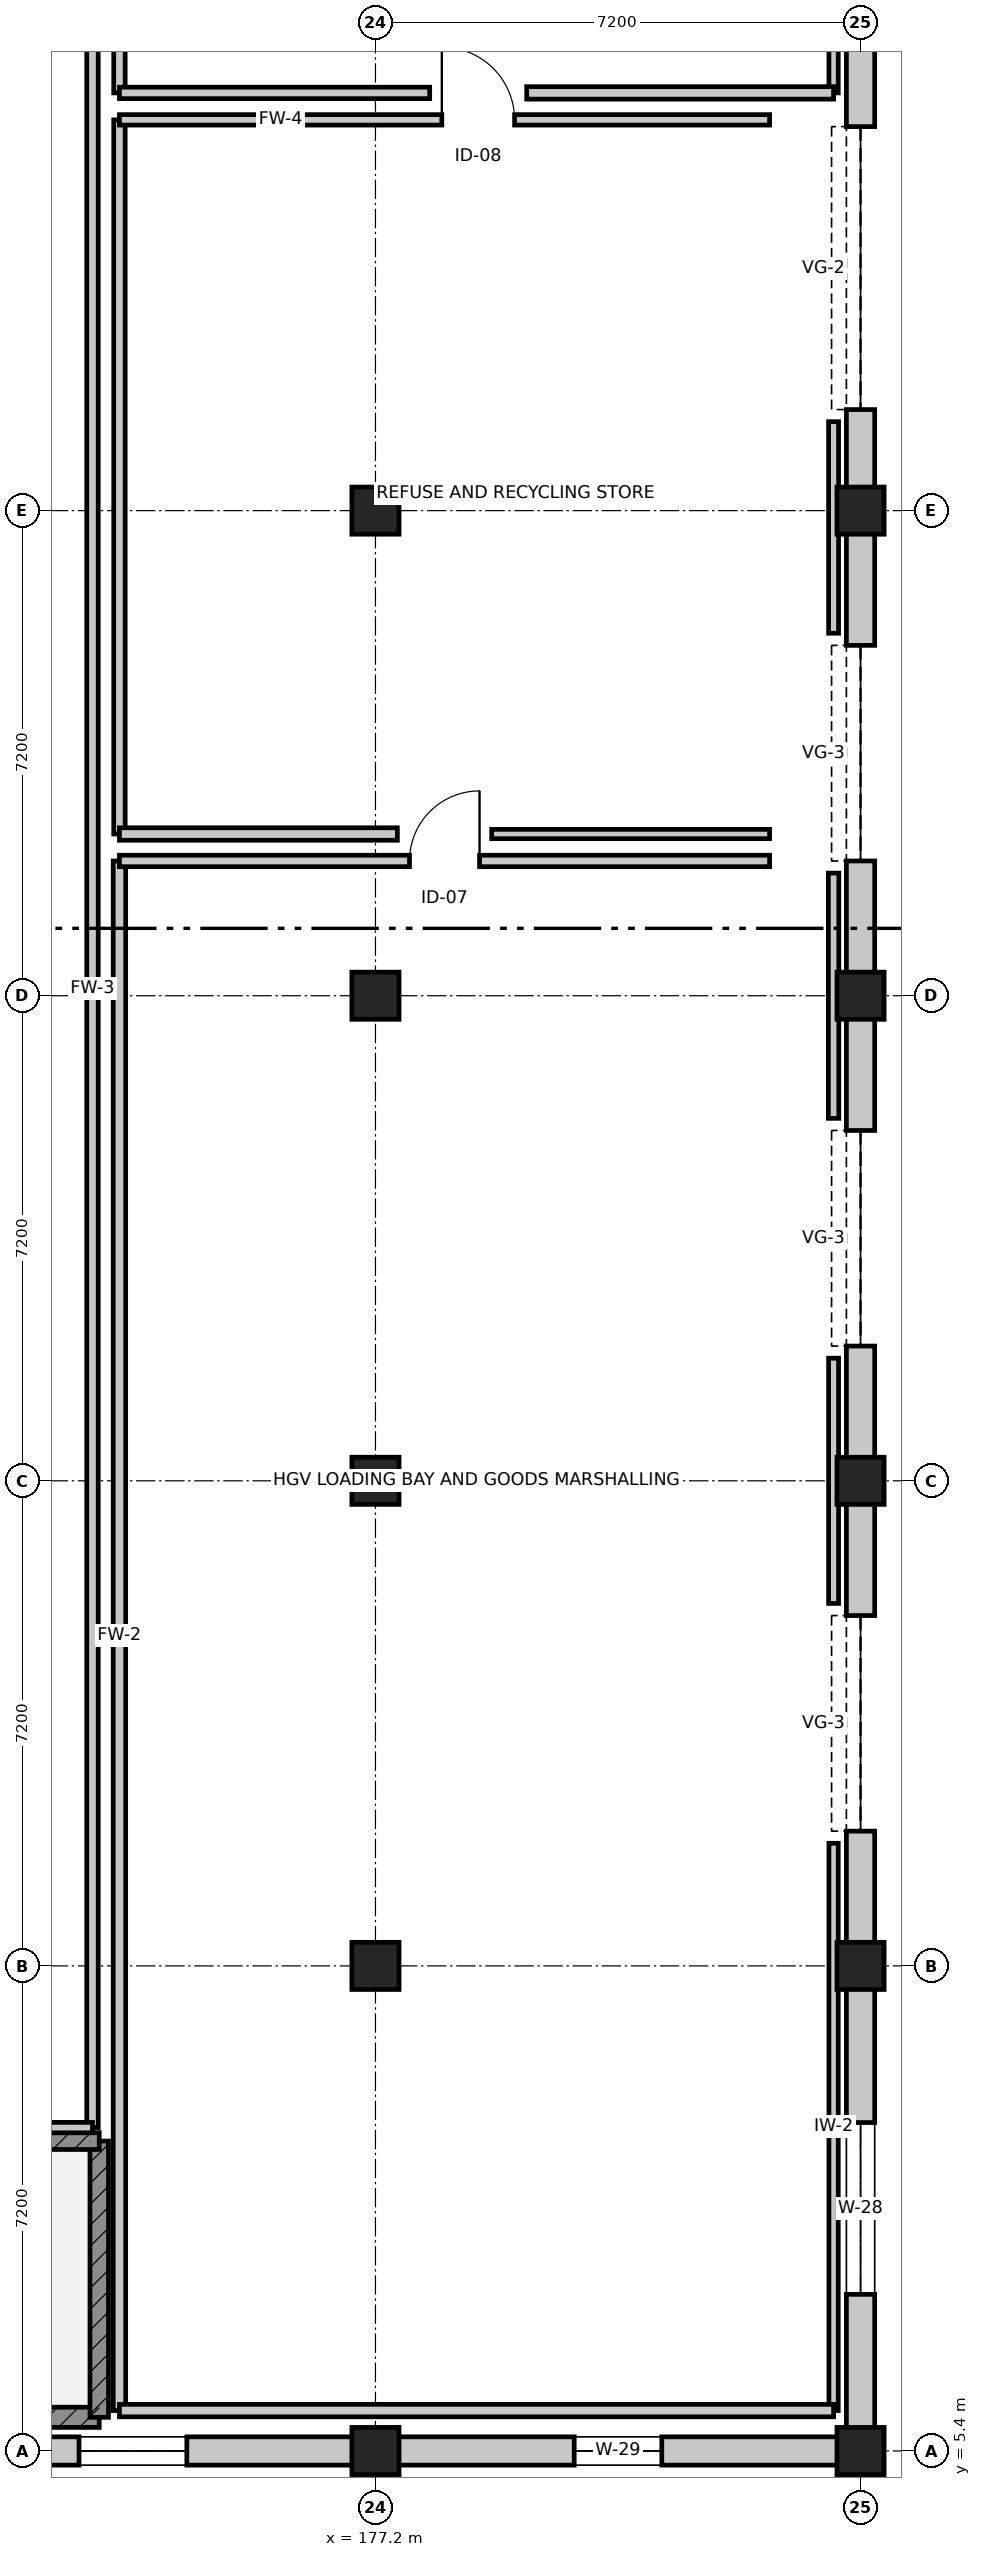
"""IFC4 building model, lengths in metres.
Left out: names, types, materials, properties, quantities, classifications, styles, units other than length and angle.
Written with IfcOpenShell. Run it as: python <this file> out.ifc"""

import sys

from ifc_helpers import new_model, si_unit, direction, frame, frame_2d, origin, origin_2d, place, context, subcontext, project, spatial, rectangle, extrude, element, fill, save


model = new_model("IFC4")
c1 = context("Model", 3, precision=1e-05, world=origin(), true_north=direction((0.0, 1.0)))
c2 = subcontext(c1, "Body", "Model", "MODEL_VIEW")
j1 = project(units=[si_unit("LENGTHUNIT", "METRE"), si_unit("PLANEANGLEUNIT", "RADIAN")], contexts=[c1])
p1 = place(None, origin())
s1 = spatial("IfcSite", under=j1, at=p1, CompositionType="ELEMENT")
p2 = place(p1, origin())
s2 = spatial("IfcBuilding", under=s1, at=p2, CompositionType="ELEMENT")
p3 = place(p2, origin())
s3 = spatial("IfcBuildingStorey", under=s2, at=p3, CompositionType="ELEMENT", Elevation=0.0)
for number, where, z_axis, x_axis in (
    (1, (177.2, 5.4, 0.0), (0.0, 0.0, 1.0), (1.0, 0.0, 0.0)),
    (2, (177.2, 12.6, 0.0), (0.0, 0.0, 1.0), (1.0, 0.0, 0.0)),
    (3, (177.2, 19.8, 0.0), (0.0, 0.0, 1.0), (1.0, 0.0, 0.0)),
    (4, (177.2, 27.0, 0.0), (0.0, 0.0, 1.0), (1.0, 0.0, 0.0)),
    (5, (177.2, 34.2, 0.0), (0.0, 0.0, 1.0), (1.0, 0.0, 0.0)),
    (6, (184.4, 5.4, 0.0), (0.0, 0.0, 1.0), (1.0, 0.0, 0.0)),
    (7, (184.4, 12.6, 0.0), (0.0, 0.0, 1.0), (1.0, 0.0, 0.0)),
    (8, (184.4, 19.8, 0.0), (0.0, 0.0, 1.0), (1.0, 0.0, 0.0)),
    (9, (184.4, 27.0, 0.0), (0.0, 0.0, 1.0), (1.0, 0.0, 0.0)),
    (10, (184.4, 34.2, 0.0), (0.0, 0.0, 1.0), (1.0, 0.0, 0.0)),
):
    element("IfcColumn", number, at=place(p3, frame(where, z_axis=z_axis, x_axis=x_axis)), inside=s3, PredefinedType="COLUMN", context=c2, shape_type="SweptSolid", body=[
        extrude(rectangle(XDim=0.7, YDim=0.7, at=origin_2d()), origin(), (0.0, 0.0, 1.0), 5.4),
    ])
p4 = place(p3, frame((184.4, 41.4, 0.0), z_axis=(0.0, 0.0, 1.0), x_axis=(0.0, -1.0, 0.0)))
e11 = element("IfcWall", 11, at=p4, inside=s3, PredefinedType="STANDARD", context=c2, shape_type="SweptSolid", body=[
    extrude(rectangle(XDim=7.2, YDim=0.42, at=frame_2d((3.6, 0.0))), origin(), (0.0, 0.0, 1.0), 4.625),
])
p5 = place(p4, frame((1.5, 0.0, 0.0)))
e12 = element("IfcOpeningElement", 12, at=p5, cuts=e11, PredefinedType="OPENING", context=c2, shape_type="SweptSolid", body=[
    extrude(rectangle(XDim=4.2, YDim=3.6, at=frame_2d((2.1, 1.8))), frame((0.0, 0.22, 0.0), z_axis=(0.0, -1.0, 0.0), x_axis=(1.0, 0.0, 0.0)), (0.0, 0.0, 1.0), 0.44),
])
p6 = place(p3, frame((184.4, 34.2, 0.0), z_axis=(0.0, 0.0, 1.0), x_axis=(0.0, -1.0, 0.0)))
e13 = element("IfcWall", 13, at=p6, inside=s3, PredefinedType="STANDARD", context=c2, shape_type="SweptSolid", body=[
    extrude(rectangle(XDim=7.2, YDim=0.42, at=frame_2d((3.6, 0.0))), origin(), (0.0, 0.0, 1.0), 4.625),
])
p7 = place(p6, frame((2.0, 0.0, 0.0)))
e14 = element("IfcOpeningElement", 14, at=p7, cuts=e13, PredefinedType="OPENING", context=c2, shape_type="SweptSolid", body=[
    extrude(rectangle(XDim=3.2, YDim=2.8, at=frame_2d((1.6, 1.4))), frame((0.0, 0.22, 0.0), z_axis=(0.0, -1.0, 0.0), x_axis=(1.0, 0.0, 0.0)), (0.0, 0.0, 1.0), 0.44),
])
p8 = place(p3, frame((184.4, 27.0, 0.0), z_axis=(0.0, 0.0, 1.0), x_axis=(0.0, -1.0, 0.0)))
e15 = element("IfcWall", 15, at=p8, inside=s3, PredefinedType="STANDARD", context=c2, shape_type="SweptSolid", body=[
    extrude(rectangle(XDim=7.2, YDim=0.42, at=frame_2d((3.6, 0.0))), origin(), (0.0, 0.0, 1.0), 4.625),
])
p9 = place(p8, frame((2.0, 0.0, 0.0)))
e16 = element("IfcOpeningElement", 16, at=p9, cuts=e15, PredefinedType="OPENING", context=c2, shape_type="SweptSolid", body=[
    extrude(rectangle(XDim=3.2, YDim=2.8, at=frame_2d((1.6, 1.4))), frame((0.0, 0.22, 0.0), z_axis=(0.0, -1.0, 0.0), x_axis=(1.0, 0.0, 0.0)), (0.0, 0.0, 1.0), 0.44),
])
p10 = place(p3, frame((184.4, 19.8, 0.0), z_axis=(0.0, 0.0, 1.0), x_axis=(0.0, -1.0, 0.0)))
e17 = element("IfcWall", 17, at=p10, inside=s3, PredefinedType="STANDARD", context=c2, shape_type="SweptSolid", body=[
    extrude(rectangle(XDim=7.2, YDim=0.42, at=frame_2d((3.6, 0.0))), origin(), (0.0, 0.0, 1.0), 4.625),
])
p11 = place(p10, frame((2.0, 0.0, 0.0)))
e18 = element("IfcOpeningElement", 18, at=p11, cuts=e17, PredefinedType="OPENING", context=c2, shape_type="SweptSolid", body=[
    extrude(rectangle(XDim=3.2, YDim=2.8, at=frame_2d((1.6, 1.4))), frame((0.0, 0.22, 0.0), z_axis=(0.0, -1.0, 0.0), x_axis=(1.0, 0.0, 0.0)), (0.0, 0.0, 1.0), 0.44),
])
p12 = place(p3, frame((184.4, 12.6, 0.0), z_axis=(0.0, 0.0, 1.0), x_axis=(0.0, -1.0, 0.0)))
e19 = element("IfcWall", 19, at=p12, inside=s3, PredefinedType="STANDARD", context=c2, shape_type="SweptSolid", body=[
    extrude(rectangle(XDim=7.2, YDim=0.42, at=frame_2d((3.6, 0.0))), origin(), (0.0, 0.0, 1.0), 4.625),
])
p13 = place(p12, frame((2.325, 0.0, 0.9)))
e20 = element("IfcOpeningElement", 20, at=p13, cuts=e19, PredefinedType="OPENING", context=c2, shape_type="SweptSolid", body=[
    extrude(rectangle(XDim=2.55, YDim=1.85, at=frame_2d((1.275, 0.925))), frame((0.0, 0.22, 0.0), z_axis=(0.0, -1.0, 0.0), x_axis=(1.0, 0.0, 0.0)), (0.0, 0.0, 1.0), 0.44),
])
p14 = place(p3, frame((184.4, 5.4, 0.0), z_axis=(0.0, 0.0, 1.0), x_axis=(-1.0, 0.0, 0.0)))
e21 = element("IfcWall", 21, at=p14, inside=s3, PredefinedType="STANDARD", context=c2, shape_type="SweptSolid", body=[
    extrude(rectangle(XDim=7.2, YDim=0.42, at=frame_2d((3.6, 0.0))), origin(), (0.0, 0.0, 1.0), 4.435),
])
p15 = place(p14, frame((2.95, 0.0, 0.9)))
e22 = element("IfcOpeningElement", 22, at=p15, cuts=e21, PredefinedType="OPENING", context=c2, shape_type="SweptSolid", body=[
    extrude(rectangle(XDim=1.3, YDim=1.95, at=frame_2d((0.65, 0.975))), frame((0.0, 0.22, 0.0), z_axis=(0.0, -1.0, 0.0), x_axis=(1.0, 0.0, 0.0)), (0.0, 0.0, 1.0), 0.44),
])
p16 = place(p3, frame((177.2, 5.4, 0.0), z_axis=(0.0, 0.0, 1.0), x_axis=(-1.0, 0.0, 0.0)))
e23 = element("IfcWall", 23, at=p16, inside=s3, PredefinedType="STANDARD", context=c2, shape_type="SweptSolid", body=[
    extrude(rectangle(XDim=7.2, YDim=0.42, at=frame_2d((3.6, 0.0))), origin(), (0.0, 0.0, 1.0), 4.435),
])
p17 = place(p16, frame((2.8, 0.0, 0.9)))
e24 = element("IfcOpeningElement", 24, at=p17, cuts=e23, PredefinedType="OPENING", context=c2, shape_type="SweptSolid", body=[
    extrude(rectangle(XDim=1.6, YDim=1.95, at=frame_2d((0.8, 0.975))), frame((0.0, 0.22, 0.0), z_axis=(0.0, -1.0, 0.0), x_axis=(1.0, 0.0, 0.0)), (0.0, 0.0, 1.0), 0.44),
])
p18 = place(p3, frame((164.1, 5.9, 0.0), z_axis=(0.0, 0.0, 1.0), x_axis=(1.0, 0.0, 0.0)))
e25 = element("IfcWall", 25, at=p18, inside=s3, PredefinedType="SHEAR", context=c2, shape_type="SweptSolid", body=[
    extrude(rectangle(XDim=9.0, YDim=0.3, at=frame_2d((4.5, 0.0))), origin(), (0.0, 0.0, 1.0), 5.1),
])
p19 = place(p3, frame((173.1, 5.9, 0.0), z_axis=(0.0, 0.0, 1.0), x_axis=(0.0, 1.0, 0.0)))
e26 = element("IfcWall", 26, at=p19, inside=s3, PredefinedType="SHEAR", context=c2, shape_type="SweptSolid", body=[
    extrude(rectangle(XDim=4.1, YDim=0.275, at=frame_2d((2.05, 0.0))), origin(), (0.0, 0.0, 1.0), 5.1),
])
p20 = place(p3, frame((173.1, 10.0, 0.0), z_axis=(0.0, 0.0, 1.0), x_axis=(-1.0, 0.0, 0.0)))
e27 = element("IfcWall", 27, at=p20, inside=s3, PredefinedType="SHEAR", context=c2, shape_type="SweptSolid", body=[
    extrude(rectangle(XDim=9.0, YDim=0.25, at=frame_2d((4.5, 0.0))), origin(), (0.0, 0.0, 1.0), 5.1),
])
p21 = place(p20, frame((7.35, 0.0, 0.0)))
e28 = element("IfcOpeningElement", 28, at=p21, cuts=e27, PredefinedType="OPENING", context=c2, shape_type="SweptSolid", body=[
    extrude(rectangle(XDim=1.1, YDim=2.1, at=frame_2d((0.55, 1.05))), frame((0.0, 0.135, 0.0), z_axis=(0.0, -1.0, 0.0), x_axis=(1.0, 0.0, 0.0)), (0.0, 0.0, 1.0), 0.27),
])
p22 = place(p3, frame((173.0, 44.0, 0.0), z_axis=(0.0, 0.0, 1.0), x_axis=(0.0, -1.0, 0.0)))
e29 = element("IfcWall", 29, at=p22, inside=s3, PredefinedType="PARTITIONING", context=c2, shape_type="SweptSolid", body=[
    extrude(rectangle(XDim=33.8, YDim=0.17, at=frame_2d((16.9, 0.0))), origin(), (0.0, 0.0, 1.0), 4.473),
])
p23 = place(p3, frame((173.0, 10.2, 0.0), z_axis=(0.0, 0.0, 1.0), x_axis=(-1.0, 0.0, 0.0)))
e30 = element("IfcWall", 30, at=p23, inside=s3, PredefinedType="PARTITIONING", context=c2, shape_type="SweptSolid", body=[
    extrude(rectangle(XDim=7.07, YDim=0.155, at=frame_2d((3.535, 0.0))), origin(), (0.0, 0.0, 1.0), 5.1),
])
p24 = place(p3, frame((173.4, 6.0, 0.0), z_axis=(0.0, 0.0, 1.0), x_axis=(0.0, 1.0, 0.0)))
e31 = element("IfcWall", 31, at=p24, inside=s3, PredefinedType="PARTITIONING", context=c2, shape_type="SweptSolid", body=[
    extrude(rectangle(XDim=23.0, YDim=0.185, at=frame_2d((11.5, 0.0))), origin(), (0.0, 0.0, 1.0), 4.473),
])
p25 = place(p3, frame((173.4, 29.0, 0.0), z_axis=(0.0, 0.0, 1.0), x_axis=(1.0, 0.0, 0.0)))
e32 = element("IfcWall", 32, at=p25, inside=s3, PredefinedType="PARTITIONING", context=c2, shape_type="SweptSolid", body=[
    extrude(rectangle(XDim=9.65, YDim=0.17, at=frame_2d((4.825, 0.0))), origin(), (0.0, 0.0, 1.0), 4.397),
])
p26 = place(p25, frame((4.305, 0.0, 0.0)))
e33 = element("IfcOpeningElement", 33, at=p26, cuts=e32, PredefinedType="OPENING", context=c2, shape_type="SweptSolid", body=[
    extrude(rectangle(XDim=1.04, YDim=2.12, at=frame_2d((0.52, 1.06))), frame((0.0, 0.095, 0.0), z_axis=(0.0, -1.0, 0.0), x_axis=(1.0, 0.0, 0.0)), (0.0, 0.0, 1.0), 0.19),
])
p27 = place(p3, frame((184.0, 28.82, 0.0), z_axis=(0.0, 0.0, 1.0), x_axis=(0.0, -1.0, 0.0)))
e34 = element("IfcWall", 34, at=p27, inside=s3, PredefinedType="PARTITIONING", context=c2, shape_type="SweptSolid", body=[
    extrude(rectangle(XDim=3.64, YDim=0.155, at=frame_2d((1.82, 0.0))), origin(), (0.0, 0.0, 1.0), 4.473),
])
p28 = place(p3, frame((184.0, 21.62, 0.0), z_axis=(0.0, 0.0, 1.0), x_axis=(0.0, -1.0, 0.0)))
e35 = element("IfcWall", 35, at=p28, inside=s3, PredefinedType="PARTITIONING", context=c2, shape_type="SweptSolid", body=[
    extrude(rectangle(XDim=3.64, YDim=0.148, at=frame_2d((1.82, 0.0))), origin(), (0.0, 0.0, 1.0), 4.473),
])
p29 = place(p3, frame((184.0, 14.42, 0.0), z_axis=(0.0, 0.0, 1.0), x_axis=(0.0, -1.0, 0.0)))
e36 = element("IfcWall", 36, at=p29, inside=s3, PredefinedType="PARTITIONING", context=c2, shape_type="SweptSolid", body=[
    extrude(rectangle(XDim=8.42, YDim=0.138, at=frame_2d((4.21, 0.0))), origin(), (0.0, 0.0, 1.0), 4.473),
])
p30 = place(p3, frame((184.0, 6.0, 0.0), z_axis=(0.0, 0.0, 1.0), x_axis=(-1.0, 0.0, 0.0)))
e37 = element("IfcWall", 37, at=p30, inside=s3, PredefinedType="PARTITIONING", context=c2, shape_type="SweptSolid", body=[
    extrude(rectangle(XDim=10.6, YDim=0.185, at=frame_2d((5.3, 0.0))), origin(), (0.0, 0.0, 1.0), 4.397),
])
p31 = place(p3, frame((173.4, 29.4, 0.0), z_axis=(0.0, 0.0, 1.0), x_axis=(0.0, 1.0, 0.0)))
e38 = element("IfcWall", 38, at=p31, inside=s3, PredefinedType="PARTITIONING", context=c2, shape_type="SweptSolid", body=[
    extrude(rectangle(XDim=10.6, YDim=0.17, at=frame_2d((5.3, 0.0))), origin(), (0.0, 0.0, 1.0), 4.473),
])
p32 = place(p3, frame((173.4, 40.0, 0.0), z_axis=(0.0, 0.0, 1.0), x_axis=(1.0, 0.0, 0.0)))
e39 = element("IfcWall", 39, at=p32, inside=s3, PredefinedType="PARTITIONING", context=c2, shape_type="SweptSolid", body=[
    extrude(rectangle(XDim=9.65, YDim=0.155, at=frame_2d((4.825, 0.0))), origin(), (0.0, 0.0, 1.0), 4.397),
])
p33 = place(p32, frame((4.785, 0.0, 0.0)))
e40 = element("IfcOpeningElement", 40, at=p33, cuts=e39, PredefinedType="OPENING", context=c2, shape_type="SweptSolid", body=[
    extrude(rectangle(XDim=1.08, YDim=2.15, at=frame_2d((0.54, 1.075))), frame((0.0, 0.087, 0.0), z_axis=(0.0, -1.0, 0.0), x_axis=(1.0, 0.0, 0.0)), (0.0, 0.0, 1.0), 0.175),
])
p34 = place(p3, frame((184.0, 35.52, 0.0), z_axis=(0.0, 0.0, 1.0), x_axis=(0.0, -1.0, 0.0)))
e41 = element("IfcWall", 41, at=p34, inside=s3, PredefinedType="PARTITIONING", context=c2, shape_type="SweptSolid", body=[
    extrude(rectangle(XDim=3.14, YDim=0.148, at=frame_2d((1.57, 0.0))), origin(), (0.0, 0.0, 1.0), 4.473),
])
p35 = place(p3, frame((183.05, 29.4, 0.0), z_axis=(0.0, 0.0, 1.0), x_axis=(-1.0, 0.0, 0.0)))
e42 = element("IfcWall", 42, at=p35, inside=s3, PredefinedType="PARTITIONING", context=c2, shape_type="SweptSolid", body=[
    extrude(rectangle(XDim=4.125, YDim=0.138, at=frame_2d((2.062, 0.0))), origin(), (0.0, 0.0, 1.0), 5.1),
])
p36 = place(p3, frame((177.525, 29.4, 0.0), z_axis=(0.0, 0.0, 1.0), x_axis=(-1.0, 0.0, 0.0)))
e43 = element("IfcWall", 43, at=p36, inside=s3, PredefinedType="PARTITIONING", context=c2, shape_type="SweptSolid", body=[
    extrude(rectangle(XDim=4.125, YDim=0.185, at=frame_2d((2.062, 0.0))), origin(), (0.0, 0.0, 1.0), 4.397),
])
p37 = place(p3, frame((173.4, 40.4, 0.0), z_axis=(0.0, 0.0, 1.0), x_axis=(0.0, 1.0, 0.0)))
e44 = element("IfcWall", 44, at=p37, inside=s3, PredefinedType="PARTITIONING", context=c2, shape_type="SweptSolid", body=[
    extrude(rectangle(XDim=9.0, YDim=0.17, at=frame_2d((4.5, 0.0))), origin(), (0.0, 0.0, 1.0), 4.473),
])
p38 = place(p3, frame((184.0, 42.72, 0.0), z_axis=(0.0, 0.0, 1.0), x_axis=(0.0, -1.0, 0.0)))
e45 = element("IfcWall", 45, at=p38, inside=s3, PredefinedType="PARTITIONING", context=c2, shape_type="SweptSolid", body=[
    extrude(rectangle(XDim=2.32, YDim=0.138, at=frame_2d((1.16, 0.0))), origin(), (0.0, 0.0, 1.0), 4.473),
])
p39 = place(p3, frame((184.0, 40.4, 0.0), z_axis=(0.0, 0.0, 1.0), x_axis=(-1.0, 0.0, 0.0)))
e46 = element("IfcWall", 46, at=p39, inside=s3, PredefinedType="PARTITIONING", context=c2, shape_type="SweptSolid", body=[
    extrude(rectangle(XDim=4.555, YDim=0.185, at=frame_2d((2.277, 0.0))), origin(), (0.0, 0.0, 1.0), 5.1),
])
p40 = place(p3, frame((178.005, 40.4, 0.0), z_axis=(0.0, 0.0, 1.0), x_axis=(-1.0, 0.0, 0.0)))
e47 = element("IfcWall", 47, at=p40, inside=s3, PredefinedType="PARTITIONING", context=c2, shape_type="SweptSolid", body=[
    extrude(rectangle(XDim=4.605, YDim=0.17, at=frame_2d((2.302, 0.0))), origin(), (0.0, 0.0, 1.0), 4.397),
])
p41 = place(p5, origin())
e48 = element("IfcDoor", 48, at=p41, inside=s3, OperationType="ROLLINGUP", PredefinedType="GATE", context=c2, shape_type="SweptSolid", body=[
    extrude(rectangle(XDim=4.2, YDim=3.6, at=frame_2d((2.1, 1.8))), frame((0.0, 0.025, 0.0), z_axis=(0.0, -1.0, 0.0), x_axis=(1.0, 0.0, 0.0)), (0.0, 0.0, 1.0), 0.05),
])
fill(e12, e48)
p42 = place(p7, origin())
e49 = element("IfcDoor", 49, at=p42, inside=s3, OperationType="ROLLINGUP", PredefinedType="GATE", context=c2, shape_type="SweptSolid", body=[
    extrude(rectangle(XDim=3.2, YDim=2.8, at=frame_2d((1.6, 1.4))), frame((0.0, 0.025, 0.0), z_axis=(0.0, -1.0, 0.0), x_axis=(1.0, 0.0, 0.0)), (0.0, 0.0, 1.0), 0.05),
])
fill(e14, e49)
p43 = place(p9, origin())
e50 = element("IfcDoor", 50, at=p43, inside=s3, OperationType="ROLLINGUP", PredefinedType="GATE", context=c2, shape_type="SweptSolid", body=[
    extrude(rectangle(XDim=3.2, YDim=2.8, at=frame_2d((1.6, 1.4))), frame((0.0, 0.025, 0.0), z_axis=(0.0, -1.0, 0.0), x_axis=(1.0, 0.0, 0.0)), (0.0, 0.0, 1.0), 0.05),
])
fill(e16, e50)
p44 = place(p11, origin())
e51 = element("IfcDoor", 51, at=p44, inside=s3, OperationType="ROLLINGUP", PredefinedType="GATE", context=c2, shape_type="SweptSolid", body=[
    extrude(rectangle(XDim=3.2, YDim=2.8, at=frame_2d((1.6, 1.4))), frame((0.0, 0.025, 0.0), z_axis=(0.0, -1.0, 0.0), x_axis=(1.0, 0.0, 0.0)), (0.0, 0.0, 1.0), 0.05),
])
fill(e18, e51)
p45 = place(p13, origin())
e52 = element("IfcWindow", 52, at=p45, inside=s3, PartitioningType="SINGLE_PANEL", PredefinedType="WINDOW", context=c2, shape_type="SweptSolid", body=[
    extrude(rectangle(XDim=2.55, YDim=1.85, at=frame_2d((1.275, 0.925))), frame((0.0, 0.03, 0.0), z_axis=(0.0, -1.0, 0.0), x_axis=(1.0, 0.0, 0.0)), (0.0, 0.0, 1.0), 0.06),
])
fill(e20, e52)
p46 = place(p15, origin())
e53 = element("IfcWindow", 53, at=p46, inside=s3, PartitioningType="SINGLE_PANEL", PredefinedType="WINDOW", context=c2, shape_type="SweptSolid", body=[
    extrude(rectangle(XDim=1.3, YDim=1.95, at=frame_2d((0.65, 0.975))), frame((0.0, 0.03, 0.0), z_axis=(0.0, -1.0, 0.0), x_axis=(1.0, 0.0, 0.0)), (0.0, 0.0, 1.0), 0.06),
])
fill(e22, e53)
p47 = place(p17, origin())
e54 = element("IfcWindow", 54, at=p47, inside=s3, PartitioningType="SINGLE_PANEL", PredefinedType="WINDOW", context=c2, shape_type="SweptSolid", body=[
    extrude(rectangle(XDim=1.6, YDim=1.95, at=frame_2d((0.8, 0.975))), frame((0.0, 0.03, 0.0), z_axis=(0.0, -1.0, 0.0), x_axis=(1.0, 0.0, 0.0)), (0.0, 0.0, 1.0), 0.06),
])
fill(e24, e54)
p48 = place(p26, origin())
e55 = element("IfcDoor", 55, at=p48, inside=s3, OperationType="SINGLE_SWING_RIGHT", PredefinedType="DOOR", context=c2, shape_type="SweptSolid", body=[
    extrude(rectangle(XDim=1.04, YDim=2.12, at=frame_2d((0.52, 1.06))), frame((0.0, 0.025, 0.0), z_axis=(0.0, -1.0, 0.0), x_axis=(1.0, 0.0, 0.0)), (0.0, 0.0, 1.0), 0.05),
])
fill(e33, e55)
p49 = place(p33, origin())
e56 = element("IfcDoor", 56, at=p49, inside=s3, OperationType="SINGLE_SWING_LEFT", PredefinedType="DOOR", context=c2, shape_type="SweptSolid", body=[
    extrude(rectangle(XDim=1.08, YDim=2.15, at=frame_2d((0.54, 1.075))), frame((0.0, 0.025, 0.0), z_axis=(0.0, -1.0, 0.0), x_axis=(1.0, 0.0, 0.0)), (0.0, 0.0, 1.0), 0.05),
])
fill(e40, e56)
save(model, sys.argv[1])
